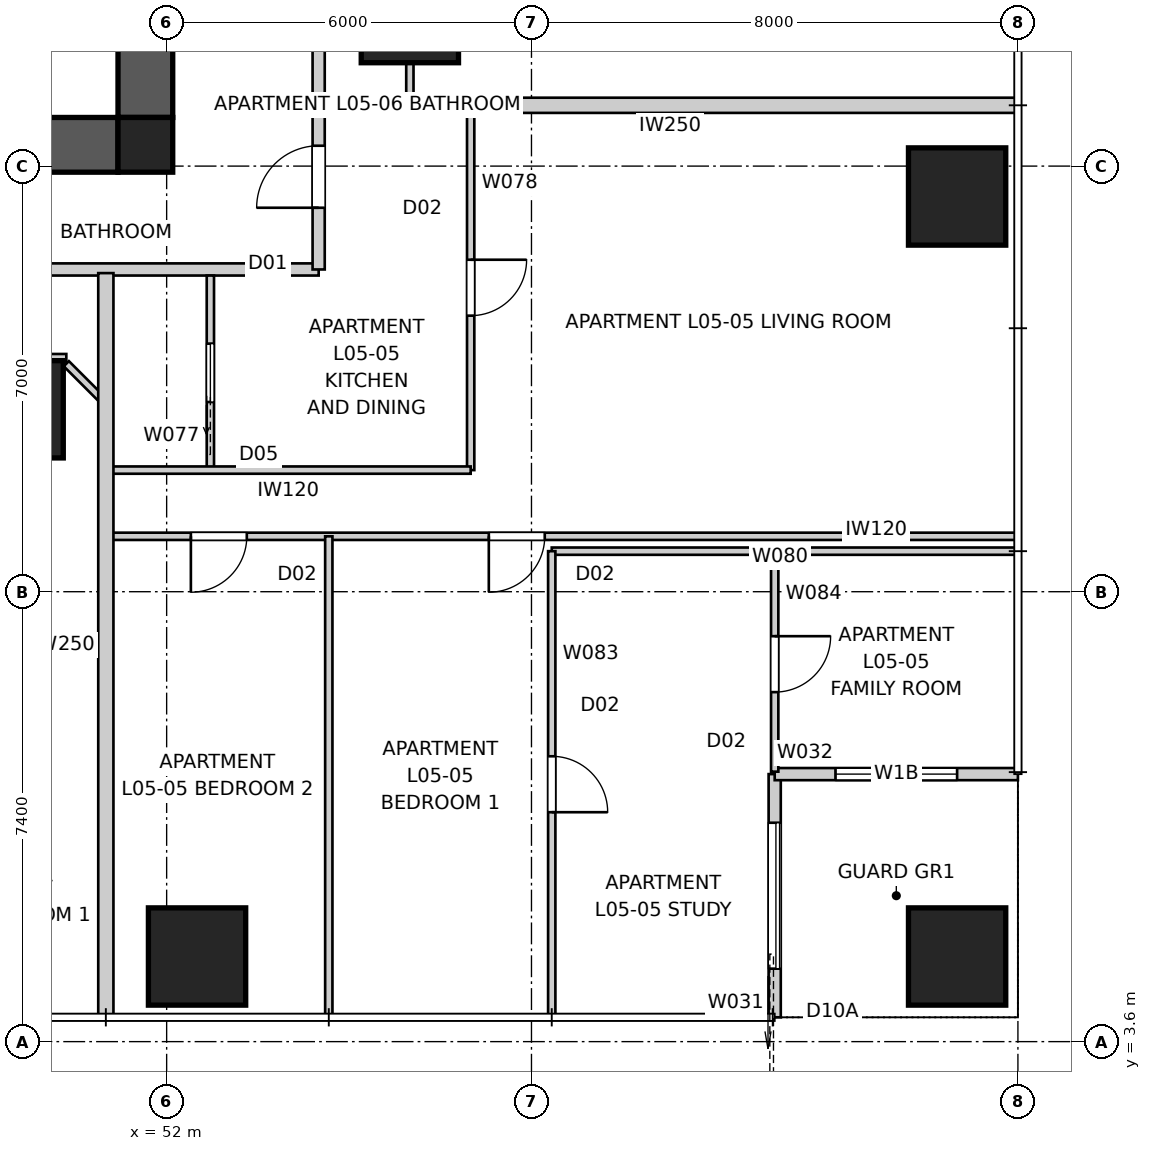
"""IFC4 building model, lengths in metres.
Left out: names, types, materials, properties, quantities, classifications, styles, units other than length and angle.
Written with IfcOpenShell. Run it as: python <this file> out.ifc"""

import sys

from ifc_helpers import new_model, si_unit, direction, frame, frame_2d, origin, origin_2d, place, context, subcontext, project, spatial, polyline, rectangle, outline, extrude, element, fill, save


model = new_model("IFC4")
c1 = context("Model", 3, precision=1e-05, world=origin(), true_north=direction((0.0, 1.0)))
c2 = subcontext(c1, "Body", "Model", "MODEL_VIEW")
j1 = project(units=[si_unit("LENGTHUNIT", "METRE"), si_unit("PLANEANGLEUNIT", "RADIAN")], contexts=[c1])
p1 = place(None, origin())
s1 = spatial("IfcSite", under=j1, at=p1, CompositionType="ELEMENT")
p2 = place(p1, origin())
s2 = spatial("IfcBuilding", under=s1, at=p2, CompositionType="ELEMENT")
p3 = place(p2, frame((0.0, 0.0, 21.8)))
s3 = spatial("IfcBuildingStorey", under=s2, at=p3, CompositionType="ELEMENT", Elevation=21.8)
p4 = place(p3, frame((51.2, 18.35, 0.0), z_axis=(0.0, 0.0, 1.0), x_axis=(-1.0, 0.0, 0.0)))
e1 = element("IfcWall", 1, at=p4, inside=s3, PredefinedType="SHEAR", context=c2, shape_type="SweptSolid", body=[
    extrude(outline(polyline([(0.0, -0.45), (22.4, -0.45), (22.4, -0.025), (22.85, -0.025), (22.85, 0.025), (22.4, 0.025), (22.4, 0.45), (0.0, 0.45), (0.0, 0.025), (-0.45, 0.025), (-0.45, -0.025), (0.0, -0.025), (0.0, -0.45)])), origin(), (0.0, 0.0, 1.0), 3.4),
])
p5 = place(p3, frame((51.65, 18.8, 0.0), z_axis=(0.0, 0.0, 1.0), x_axis=(0.0, 1.0, 0.0)))
e2 = element("IfcWall", 2, at=p5, inside=s3, PredefinedType="SHEAR", context=c2, shape_type="SweptSolid", body=[
    extrude(outline(polyline([(0.0, -0.45), (22.4, -0.45), (22.4, -0.025), (22.85, -0.025), (22.85, 0.025), (22.4, 0.025), (22.4, 0.45), (0.0, 0.45), (0.0, 0.025), (-0.45, 0.025), (-0.45, -0.025), (0.0, -0.025), (0.0, -0.45)])), origin(), (0.0, 0.0, 1.0), 3.4),
])
p6 = place(p5, frame((11.14, 0.0, 0.0)))
e3 = element("IfcOpeningElement", 3, at=p6, cuts=e2, PredefinedType="OPENING", context=c2, shape_type="SweptSolid", body=[
    extrude(rectangle(XDim=1.02, YDim=2.4, at=frame_2d((0.51, 1.2))), frame((0.0, 0.46, 0.0), z_axis=(0.0, -1.0, 0.0), x_axis=(1.0, 0.0, 0.0)), (0.0, 0.0, 1.0), 0.92),
])
p7 = place(p3, frame((51.65, 18.35, 0.0), z_axis=(0.0, 0.0, 1.0), x_axis=(1.0, 0.0, 0.0)))
e4 = element("IfcColumn", 4, at=p7, inside=s3, PredefinedType="COLUMN", context=c2, shape_type="SweptSolid", body=[
    extrude(rectangle(XDim=0.9, YDim=0.9, at=origin_2d()), origin(), (0.0, 0.0, 1.0), 3.4),
])
for number, where, z_axis, x_axis in (
    (5, (52.5, 5.0, 0.0), (0.0, 0.0, 1.0), (1.0, 0.0, 0.0)),
    (6, (65.0, 5.0, 0.0), (0.0, 0.0, 1.0), (1.0, 0.0, 0.0)),
    (7, (65.0, 17.5, 0.0), (0.0, 0.0, 1.0), (1.0, 0.0, 0.0)),
    (8, (49.5, 14.0, 0.0), (0.0, 0.0, 1.0), (1.0, 0.0, 0.0)),
    (9, (56.0, 20.5, 0.0), (0.0, 0.0, 1.0), (1.0, 0.0, 0.0)),
):
    element("IfcColumn", number, at=place(p3, frame(where, z_axis=z_axis, x_axis=x_axis)), inside=s3, PredefinedType="COLUMN", context=c2, shape_type="SweptSolid", body=[
        extrude(rectangle(XDim=1.6, YDim=1.6, at=origin_2d()), origin(), (0.0, 0.0, 1.0), 3.4),
    ])
p8 = place(p3, frame((62.0, 4.0, 0.0), z_axis=(0.0, 0.0, 1.0), x_axis=(0.0, 1.0, 0.0)))
e10 = element("IfcWall", 10, at=p8, inside=s3, PredefinedType="SOLIDWALL", context=c2, shape_type="SweptSolid", body=[
    extrude(rectangle(XDim=4.0, YDim=0.2, at=frame_2d((2.0, 0.0))), origin(), (0.0, 0.0, 1.0), 3.25),
])
p9 = place(p8, frame((0.8, 0.0, 0.0)))
e11 = element("IfcOpeningElement", 11, at=p9, cuts=e10, PredefinedType="OPENING", context=c2, shape_type="SweptSolid", body=[
    extrude(rectangle(XDim=2.4, YDim=2.1, at=frame_2d((1.2, 1.05))), frame((0.0, 0.11, 0.0), z_axis=(0.0, -1.0, 0.0), x_axis=(1.0, 0.0, 0.0)), (0.0, 0.0, 1.0), 0.22),
])
p10 = place(p3, frame((62.0, 8.0, 0.0), z_axis=(0.0, 0.0, 1.0), x_axis=(1.0, 0.0, 0.0)))
e12 = element("IfcWall", 12, at=p10, inside=s3, PredefinedType="SOLIDWALL", context=c2, shape_type="SweptSolid", body=[
    extrude(rectangle(XDim=4.0, YDim=0.2, at=frame_2d((2.0, 0.0))), origin(), (0.0, 0.0, 1.0), 3.25),
])
p11 = place(p10, frame((1.0, 0.0, 0.45)))
e13 = element("IfcOpeningElement", 13, at=p11, cuts=e12, PredefinedType="OPENING", context=c2, shape_type="SweptSolid", body=[
    extrude(rectangle(XDim=2.0, YDim=1.8, at=frame_2d((1.0, 0.9))), frame((0.0, 0.11, 0.0), z_axis=(0.0, -1.0, 0.0), x_axis=(1.0, 0.0, 0.0)), (0.0, 0.0, 1.0), 0.22),
])
p12 = place(p3, frame((25.5, 16.3, 0.0), z_axis=(0.0, 0.0, 1.0), x_axis=(1.0, 0.0, 0.0)))
e14 = element("IfcWall", 14, at=p12, inside=s3, PredefinedType="PARTITIONING", context=c2, shape_type="SweptSolid", body=[
    extrude(rectangle(XDim=29.0, YDim=0.2, at=frame_2d((14.5, 0.0))), origin(), (0.0, 0.0, 1.0), 3.25),
])
p13 = place(p12, frame((18.734, 0.0, 0.0)))
e15 = element("IfcOpeningElement", 15, at=p13, cuts=e14, PredefinedType="OPENING", context=c2, shape_type="SweptSolid", body=[
    extrude(rectangle(XDim=1.02, YDim=2.34, at=frame_2d((0.51, 1.17))), frame((0.0, 0.11, 0.0), z_axis=(0.0, -1.0, 0.0), x_axis=(1.0, 0.0, 0.0)), (0.0, 0.0, 1.0), 0.22),
])
p14 = place(p12, frame((5.096, 0.0, 0.0)))
e16 = element("IfcOpeningElement", 16, at=p14, cuts=e14, PredefinedType="OPENING", context=c2, shape_type="SweptSolid", body=[
    extrude(rectangle(XDim=1.02, YDim=2.34, at=frame_2d((0.51, 1.17))), frame((0.0, 0.11, 0.0), z_axis=(0.0, -1.0, 0.0), x_axis=(1.0, 0.0, 0.0)), (0.0, 0.0, 1.0), 0.22),
])
p15 = place(p3, frame((54.5, 16.3, 0.0), z_axis=(0.0, 0.0, 1.0), x_axis=(0.0, 1.0, 0.0)))
e17 = element("IfcWall", 17, at=p15, inside=s3, PredefinedType="PARTITIONING", context=c2, shape_type="SweptSolid", body=[
    extrude(rectangle(XDim=27.4, YDim=0.2, at=frame_2d((13.7, 0.0))), origin(), (0.0, 0.0, 1.0), 3.25),
])
p16 = place(p15, frame((20.998, 0.0, 0.0)))
e18 = element("IfcOpeningElement", 18, at=p16, cuts=e17, PredefinedType="OPENING", context=c2, shape_type="SweptSolid", body=[
    extrude(rectangle(XDim=1.02, YDim=2.34, at=frame_2d((0.51, 1.17))), frame((0.0, 0.11, 0.0), z_axis=(0.0, -1.0, 0.0), x_axis=(1.0, 0.0, 0.0)), (0.0, 0.0, 1.0), 0.22),
])
p17 = place(p15, frame((11.119, 0.0, 0.0)))
e19 = element("IfcOpeningElement", 19, at=p17, cuts=e17, PredefinedType="OPENING", context=c2, shape_type="SweptSolid", body=[
    extrude(rectangle(XDim=1.02, YDim=2.34, at=frame_2d((0.51, 1.17))), frame((0.0, 0.11, 0.0), z_axis=(0.0, -1.0, 0.0), x_axis=(1.0, 0.0, 0.0)), (0.0, 0.0, 1.0), 0.22),
])
p18 = place(p15, frame((1.015, 0.0, 0.0)))
e20 = element("IfcOpeningElement", 20, at=p18, cuts=e17, PredefinedType="OPENING", context=c2, shape_type="SweptSolid", body=[
    extrude(rectangle(XDim=1.02, YDim=2.34, at=frame_2d((0.51, 1.17))), frame((0.0, 0.11, 0.0), z_axis=(0.0, -1.0, 0.0), x_axis=(1.0, 0.0, 0.0)), (0.0, 0.0, 1.0), 0.22),
])
p19 = place(p3, frame((51.0, 4.0, 0.0), z_axis=(0.0, 0.0, 1.0), x_axis=(0.0, 1.0, 0.0)))
e21 = element("IfcWall", 21, at=p19, inside=s3, PredefinedType="PARTITIONING", context=c2, shape_type="SweptSolid", body=[
    extrude(rectangle(XDim=12.24, YDim=0.25, at=frame_2d((6.12, 0.0))), origin(), (0.0, 0.0, 1.0), 3.25),
])
p20 = place(p3, frame((66.0, 19.0, 0.0), z_axis=(0.0, 0.0, 1.0), x_axis=(-1.0, 0.0, 0.0)))
e22 = element("IfcWall", 22, at=p20, inside=s3, PredefinedType="PARTITIONING", context=c2, shape_type="SweptSolid", body=[
    extrude(rectangle(XDim=11.44, YDim=0.25, at=frame_2d((5.72, 0.0))), origin(), (0.0, 0.0, 1.0), 3.25),
])
p21 = place(p3, frame((51.0, 14.1, 0.0), z_axis=(0.0, 0.0, 1.0), x_axis=(-0.707106781187, 0.707106781187, 0.0)))
e23 = element("IfcWall", 23, at=p21, inside=s3, PredefinedType="PARTITIONING", context=c2, shape_type="SweptSolid", body=[
    extrude(rectangle(XDim=0.919, YDim=0.12, at=frame_2d((0.459, 0.0))), origin(), (0.0, 0.0, 1.0), 3.25),
])
p22 = place(p3, frame((50.35, 14.85, 0.0), z_axis=(0.0, 0.0, 1.0), x_axis=(-1.0, 0.0, 0.0)))
e24 = element("IfcWall", 24, at=p22, inside=s3, PredefinedType="PARTITIONING", context=c2, shape_type="SweptSolid", body=[
    extrude(rectangle(XDim=1.7, YDim=0.12, at=frame_2d((0.85, 0.0))), origin(), (0.0, 0.0, 1.0), 3.25),
])
p23 = place(p3, frame((52.719, 13.0, 0.0), z_axis=(0.0, 0.0, 1.0), x_axis=(0.0, 1.0, 0.0)))
e25 = element("IfcWall", 25, at=p23, inside=s3, PredefinedType="PARTITIONING", context=c2, shape_type="SweptSolid", body=[
    extrude(rectangle(XDim=3.2, YDim=0.12, at=frame_2d((1.6, 0.0))), origin(), (0.0, 0.0, 1.0), 3.25),
])
p24 = place(p23, frame((1.12, 0.0, 0.0)))
e26 = element("IfcOpeningElement", 26, at=p24, cuts=e25, PredefinedType="OPENING", context=c2, shape_type="SweptSolid", body=[
    extrude(rectangle(XDim=0.96, YDim=2.1, at=frame_2d((0.48, 1.05))), frame((0.0, 0.07, 0.0), z_axis=(0.0, -1.0, 0.0), x_axis=(1.0, 0.0, 0.0)), (0.0, 0.0, 1.0), 0.14),
])
p25 = place(p3, frame((57.0, 19.0, 0.0), z_axis=(0.0, 0.0, 1.0), x_axis=(0.0, -1.0, 0.0)))
e27 = element("IfcWall", 27, at=p25, inside=s3, PredefinedType="PARTITIONING", context=c2, shape_type="SweptSolid", body=[
    extrude(rectangle(XDim=6.0, YDim=0.12, at=frame_2d((3.0, 0.0))), origin(), (0.0, 0.0, 1.0), 3.25),
])
p26 = place(p25, frame((2.54, 0.0, 0.0)))
e28 = element("IfcOpeningElement", 28, at=p26, cuts=e27, PredefinedType="OPENING", context=c2, shape_type="SweptSolid", body=[
    extrude(rectangle(XDim=0.92, YDim=2.34, at=frame_2d((0.46, 1.17))), frame((0.0, 0.07, 0.0), z_axis=(0.0, -1.0, 0.0), x_axis=(1.0, 0.0, 0.0)), (0.0, 0.0, 1.0), 0.14),
])
p27 = place(p3, frame((57.0, 13.0, 0.0), z_axis=(0.0, 0.0, 1.0), x_axis=(-1.0, 0.0, 0.0)))
e29 = element("IfcWall", 29, at=p27, inside=s3, PredefinedType="PARTITIONING", context=c2, shape_type="SweptSolid", body=[
    extrude(rectangle(XDim=6.0, YDim=0.12, at=frame_2d((3.0, 0.0))), origin(), (0.0, 0.0, 1.0), 3.25),
])
p28 = place(p3, frame((65.96, 11.911, 0.0), z_axis=(0.0, 0.0, 1.0), x_axis=(-1.0, 0.0, 0.0)))
e30 = element("IfcWall", 30, at=p28, inside=s3, PredefinedType="PARTITIONING", context=c2, shape_type="SweptSolid", body=[
    extrude(rectangle(XDim=14.96, YDim=0.12, at=frame_2d((7.48, 0.0))), origin(), (0.0, 0.0, 1.0), 3.25),
])
p29 = place(p28, frame((7.742, 0.0, 0.0)))
e31 = element("IfcOpeningElement", 31, at=p29, cuts=e30, PredefinedType="OPENING", context=c2, shape_type="SweptSolid", body=[
    extrude(rectangle(XDim=0.92, YDim=2.34, at=frame_2d((0.46, 1.17))), frame((0.0, 0.07, 0.0), z_axis=(0.0, -1.0, 0.0), x_axis=(1.0, 0.0, 0.0)), (0.0, 0.0, 1.0), 0.14),
])
p30 = place(p28, frame((12.642, 0.0, 0.0)))
e32 = element("IfcOpeningElement", 32, at=p30, cuts=e30, PredefinedType="OPENING", context=c2, shape_type="SweptSolid", body=[
    extrude(rectangle(XDim=0.92, YDim=2.34, at=frame_2d((0.46, 1.17))), frame((0.0, 0.07, 0.0), z_axis=(0.0, -1.0, 0.0), x_axis=(1.0, 0.0, 0.0)), (0.0, 0.0, 1.0), 0.14),
])
p31 = place(p3, frame((54.667, 4.04, 0.0), z_axis=(0.0, 0.0, 1.0), x_axis=(0.0, 1.0, 0.0)))
e33 = element("IfcWall", 33, at=p31, inside=s3, PredefinedType="PARTITIONING", context=c2, shape_type="SweptSolid", body=[
    extrude(rectangle(XDim=7.871, YDim=0.12, at=frame_2d((3.936, 0.0))), origin(), (0.0, 0.0, 1.0), 2.638),
])
p32 = place(p3, frame((65.96, 11.667, 0.0), z_axis=(0.0, 0.0, 1.0), x_axis=(-1.0, 0.0, 0.0)))
e34 = element("IfcWall", 34, at=p32, inside=s3, PredefinedType="PARTITIONING", context=c2, shape_type="SweptSolid", body=[
    extrude(rectangle(XDim=7.627, YDim=0.12, at=frame_2d((3.813, 0.0))), origin(), (0.0, 0.0, 1.0), 3.25),
])
p33 = place(p3, frame((58.333, 11.667, 0.0), z_axis=(0.0, 0.0, 1.0), x_axis=(0.0, -1.0, 0.0)))
e35 = element("IfcWall", 35, at=p33, inside=s3, PredefinedType="PARTITIONING", context=c2, shape_type="SweptSolid", body=[
    extrude(rectangle(XDim=7.627, YDim=0.12, at=frame_2d((3.813, 0.0))), origin(), (0.0, 0.0, 1.0), 3.25),
])
p34 = place(p33, frame((3.373, 0.0, 0.0)))
e36 = element("IfcOpeningElement", 36, at=p34, cuts=e35, PredefinedType="OPENING", context=c2, shape_type="SweptSolid", body=[
    extrude(rectangle(XDim=0.92, YDim=2.34, at=frame_2d((0.46, 1.17))), frame((0.0, 0.07, 0.0), z_axis=(0.0, -1.0, 0.0), x_axis=(1.0, 0.0, 0.0)), (0.0, 0.0, 1.0), 0.14),
])
p35 = place(p3, frame((62.0, 11.667, 0.0), z_axis=(0.0, 0.0, 1.0), x_axis=(0.0, -1.0, 0.0)))
e37 = element("IfcWall", 37, at=p35, inside=s3, PredefinedType="PARTITIONING", context=c2, shape_type="SweptSolid", body=[
    extrude(rectangle(XDim=3.627, YDim=0.12, at=frame_2d((1.813, 0.0))), origin(), (0.0, 0.0, 1.0), 3.25),
])
p36 = place(p35, frame((1.398, 0.0, 0.0)))
e38 = element("IfcOpeningElement", 38, at=p36, cuts=e37, PredefinedType="OPENING", context=c2, shape_type="SweptSolid", body=[
    extrude(rectangle(XDim=0.92, YDim=2.34, at=frame_2d((0.46, 1.17))), frame((0.0, 0.07, 0.0), z_axis=(0.0, -1.0, 0.0), x_axis=(1.0, 0.0, 0.0)), (0.0, 0.0, 1.0), 0.14),
])
p37 = place(p3, frame((56.0, 22.649, 0.0), z_axis=(0.0, 0.0, 1.0), x_axis=(0.0, -1.0, 0.0)))
e39 = element("IfcWall", 39, at=p37, inside=s3, PredefinedType="PARTITIONING", context=c2, shape_type="SweptSolid", body=[
    extrude(rectangle(XDim=3.649, YDim=0.12, at=frame_2d((1.824, 0.0))), origin(), (0.0, 0.0, 1.0), 2.549),
])
p38 = place(p9, origin())
e40 = element("IfcDoor", 40, at=p38, inside=s3, OperationType="SLIDING_TO_LEFT", PredefinedType="DOOR", context=c2, shape_type="SweptSolid", body=[
    extrude(rectangle(XDim=2.4, YDim=2.1, at=frame_2d((1.2, 1.05))), frame((0.0, 0.025, 0.0), z_axis=(0.0, -1.0, 0.0), x_axis=(1.0, 0.0, 0.0)), (0.0, 0.0, 1.0), 0.05),
])
fill(e11, e40)
p39 = place(p11, origin())
e41 = element("IfcWindow", 41, at=p39, inside=s3, PartitioningType="SINGLE_PANEL", PredefinedType="WINDOW", context=c2, shape_type="SweptSolid", body=[
    extrude(rectangle(XDim=2.0, YDim=1.8, at=frame_2d((1.0, 0.9))), frame((0.0, 0.03, 0.0), z_axis=(0.0, -1.0, 0.0), x_axis=(1.0, 0.0, 0.0)), (0.0, 0.0, 1.0), 0.06),
])
fill(e13, e41)
p40 = place(p18, origin())
e42 = element("IfcDoor", 42, at=p40, inside=s3, OperationType="SINGLE_SWING_LEFT", PredefinedType="DOOR", context=c2, shape_type="SweptSolid", body=[
    extrude(rectangle(XDim=1.02, YDim=2.34, at=frame_2d((0.51, 1.17))), frame((0.0, 0.025, 0.0), z_axis=(0.0, -1.0, 0.0), x_axis=(1.0, 0.0, 0.0)), (0.0, 0.0, 1.0), 0.05),
])
fill(e20, e42)
p41 = place(p26, origin())
e43 = element("IfcDoor", 43, at=p41, inside=s3, OperationType="SINGLE_SWING_LEFT", PredefinedType="DOOR", context=c2, shape_type="SweptSolid", body=[
    extrude(rectangle(XDim=0.92, YDim=2.34, at=frame_2d((0.46, 1.17))), frame((0.0, 0.025, 0.0), z_axis=(0.0, -1.0, 0.0), x_axis=(1.0, 0.0, 0.0)), (0.0, 0.0, 1.0), 0.05),
])
fill(e28, e43)
p42 = place(p24, origin())
e44 = element("IfcDoor", 44, at=p42, inside=s3, OperationType="SLIDING_TO_LEFT", PredefinedType="DOOR", context=c2, shape_type="SweptSolid", body=[
    extrude(rectangle(XDim=0.96, YDim=2.1, at=frame_2d((0.48, 1.05))), frame((0.0, 0.025, 0.0), z_axis=(0.0, -1.0, 0.0), x_axis=(1.0, 0.0, 0.0)), (0.0, 0.0, 1.0), 0.05),
])
fill(e26, e44)
p43 = place(p29, origin())
e45 = element("IfcDoor", 45, at=p43, inside=s3, OperationType="SINGLE_SWING_RIGHT", PredefinedType="DOOR", context=c2, shape_type="SweptSolid", body=[
    extrude(rectangle(XDim=0.92, YDim=2.34, at=frame_2d((0.46, 1.17))), frame((0.0, 0.025, 0.0), z_axis=(0.0, -1.0, 0.0), x_axis=(1.0, 0.0, 0.0)), (0.0, 0.0, 1.0), 0.05),
])
fill(e31, e45)
p44 = place(p30, origin())
e46 = element("IfcDoor", 46, at=p44, inside=s3, OperationType="SINGLE_SWING_RIGHT", PredefinedType="DOOR", context=c2, shape_type="SweptSolid", body=[
    extrude(rectangle(XDim=0.92, YDim=2.34, at=frame_2d((0.46, 1.17))), frame((0.0, 0.025, 0.0), z_axis=(0.0, -1.0, 0.0), x_axis=(1.0, 0.0, 0.0)), (0.0, 0.0, 1.0), 0.05),
])
fill(e32, e46)
p45 = place(p34, origin())
e47 = element("IfcDoor", 47, at=p45, inside=s3, OperationType="SINGLE_SWING_RIGHT", PredefinedType="DOOR", context=c2, shape_type="SweptSolid", body=[
    extrude(rectangle(XDim=0.92, YDim=2.34, at=frame_2d((0.46, 1.17))), frame((0.0, 0.025, 0.0), z_axis=(0.0, -1.0, 0.0), x_axis=(1.0, 0.0, 0.0)), (0.0, 0.0, 1.0), 0.05),
])
fill(e36, e47)
p46 = place(p36, origin())
e48 = element("IfcDoor", 48, at=p46, inside=s3, OperationType="SINGLE_SWING_LEFT", PredefinedType="DOOR", context=c2, shape_type="SweptSolid", body=[
    extrude(rectangle(XDim=0.92, YDim=2.34, at=frame_2d((0.46, 1.17))), frame((0.0, 0.025, 0.0), z_axis=(0.0, -1.0, 0.0), x_axis=(1.0, 0.0, 0.0)), (0.0, 0.0, 1.0), 0.05),
])
fill(e38, e48)
save(model, sys.argv[1])
